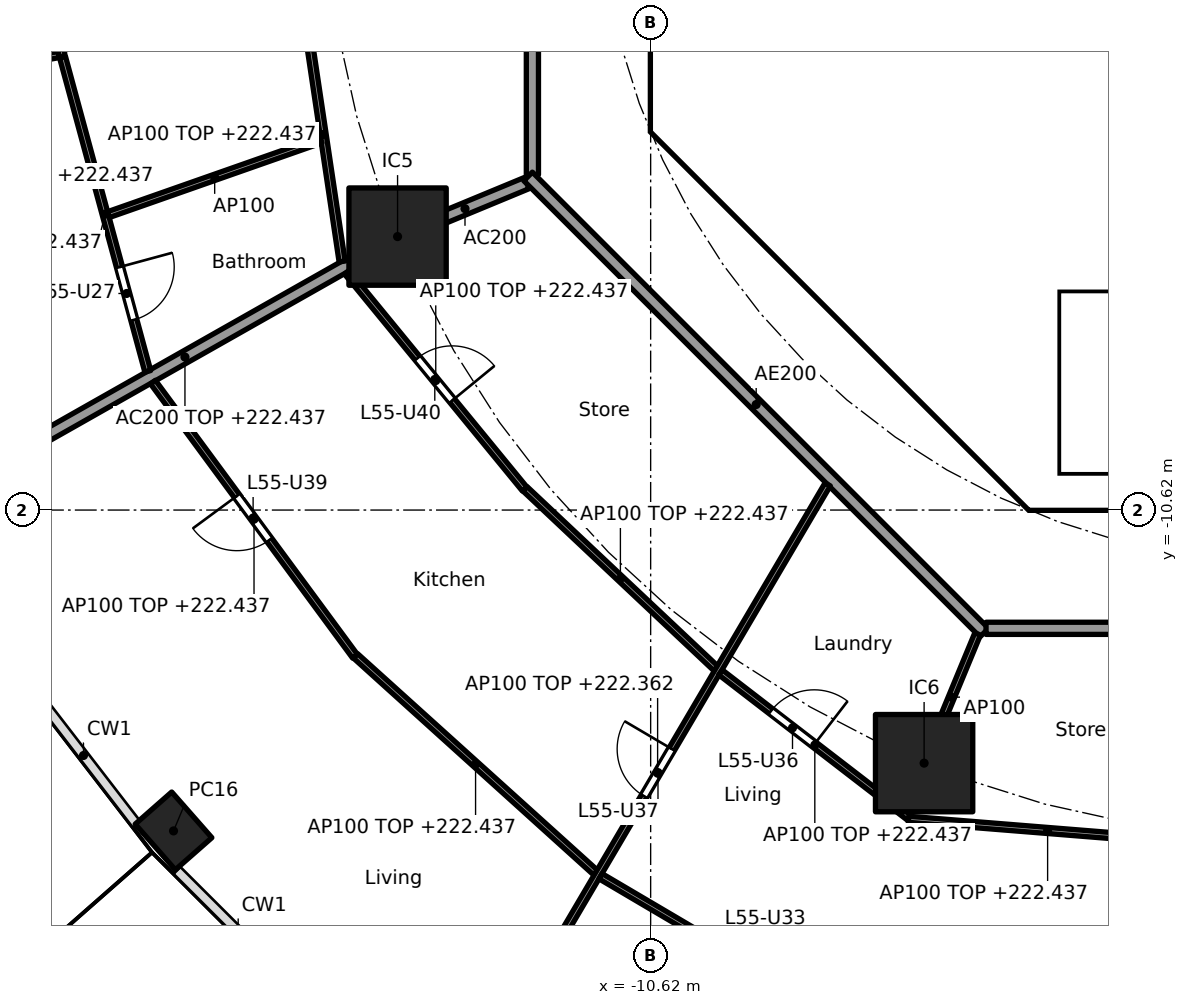
"""IFC4 building model, lengths in metres.
Left out: names, types, materials, properties, quantities, classifications, styles, units other than length and angle.
Written with IfcOpenShell. Run it as: python <this file> out.ifc"""

import sys

from ifc_helpers import new_model, si_unit, direction, frame, frame_2d, origin, origin_2d, place, context, subcontext, project, spatial, polyline, rectangle, hollow_rectangle, outline, extrude, element, fill, save


model = new_model("IFC4")
c1 = context("Model", 3, precision=1e-05, world=origin(), true_north=direction((0.0, 1.0)))
c2 = subcontext(c1, "Body", "Model", "MODEL_VIEW")
j1 = project(units=[si_unit("LENGTHUNIT", "METRE"), si_unit("PLANEANGLEUNIT", "RADIAN")], contexts=[c1])
p1 = place(None, origin())
s1 = spatial("IfcSite", under=j1, at=p1, CompositionType="ELEMENT")
p2 = place(p1, origin())
s2 = spatial("IfcBuilding", under=s1, at=p2, CompositionType="ELEMENT")
p3 = place(p2, frame((0.0, 0.0, 219.6)))
s3 = spatial("IfcBuildingStorey", under=s2, at=p3, CompositionType="ELEMENT", Elevation=219.6)
p4 = place(p3, frame((-18.467, -15.896, 0.0), z_axis=(0.0, 0.0, 1.0), x_axis=(0.660114607735, -0.751164898445, 0.0)))
e1 = element("IfcColumn", 1, at=p4, inside=s3, PredefinedType="COLUMN", context=c2, shape_type="SweptSolid", body=[
    extrude(hollow_rectangle(XDim=1.0, YDim=0.8, WallThickness=0.032, at=origin_2d()), origin(), (0.0, 0.0, 1.0), 3.7),
])
for number, where, z_axis, x_axis in (
    (2, (-14.782, -6.123, 0.0), (0.0, 0.0, 1.0), (1.0, 0.0, 0.0)),
    (3, (-6.123, -14.782, 0.0), (0.0, 0.0, 1.0), (1.0, 0.0, 0.0)),
):
    element("IfcColumn", number, at=place(p3, frame(where, z_axis=z_axis, x_axis=x_axis)), inside=s3, PredefinedType="COLUMN", context=c2, shape_type="SweptSolid", body=[
        extrude(rectangle(XDim=1.6, YDim=1.6, at=origin_2d()), origin(), (0.0, 0.0, 1.0), 3.7),
    ])
p5 = place(p3, frame((-10.325, 3.801, 0.0), z_axis=(0.0, 0.0, 1.0), x_axis=(0.0, -1.0, 0.0)))
e4 = element("IfcWall", 4, at=p5, inside=s3, PredefinedType="SHEAR", context=c2, shape_type="SweptSolid", body=[
    extrude(rectangle(XDim=7.602, YDim=0.6, at=frame_2d((3.801, 0.0))), origin(), (0.0, 0.0, 1.0), 3.44),
])
p6 = place(p5, frame((0.651, 0.0, 0.0)))
e5 = element("IfcOpeningElement", 5, at=p6, cuts=e4, PredefinedType="OPENING", context=c2, shape_type="SweptSolid", body=[
    extrude(rectangle(XDim=1.5, YDim=2.1, at=frame_2d((0.75, 1.05))), frame((0.0, 0.31, 0.0), z_axis=(0.0, -1.0, 0.0), x_axis=(1.0, 0.0, 0.0)), (0.0, 0.0, 1.0), 0.62),
])
p7 = place(p5, frame((5.451, 0.0, 0.0)))
e6 = element("IfcOpeningElement", 6, at=p7, cuts=e4, PredefinedType="OPENING", context=c2, shape_type="SweptSolid", body=[
    extrude(rectangle(XDim=1.5, YDim=2.1, at=frame_2d((0.75, 1.05))), frame((0.0, 0.31, 0.0), z_axis=(0.0, -1.0, 0.0), x_axis=(1.0, 0.0, 0.0)), (0.0, 0.0, 1.0), 0.62),
])
p8 = place(p3, frame((-9.988, -4.613, 0.0), z_axis=(0.0, 0.0, 1.0), x_axis=(0.707106781187, -0.707106781187, 0.0)))
e7 = element("IfcWall", 7, at=p8, inside=s3, PredefinedType="SHEAR", context=c2, shape_type="SweptSolid", body=[
    extrude(rectangle(XDim=7.602, YDim=0.6, at=frame_2d((3.801, 0.0))), origin(), (0.0, 0.0, 1.0), 3.44),
])
p9 = place(p8, frame((6.151, 0.0, 0.0)))
e8 = element("IfcOpeningElement", 8, at=p9, cuts=e7, PredefinedType="OPENING", context=c2, shape_type="SweptSolid", body=[
    extrude(rectangle(XDim=1.1, YDim=2.1, at=frame_2d((0.55, 1.05))), frame((0.0, 0.31, 0.0), z_axis=(0.0, -1.0, 0.0), x_axis=(1.0, 0.0, 0.0)), (0.0, 0.0, 1.0), 0.62),
])
p10 = place(p3, frame((-6.6, -7.427, 0.0), z_axis=(0.0, 0.0, 1.0), x_axis=(0.0, 1.0, 0.0)))
e9 = element("IfcWall", 9, at=p10, inside=s3, PredefinedType="PARTITIONING", context=c2, shape_type="SweptSolid", body=[
    extrude(rectangle(XDim=3.127, YDim=0.15, at=frame_2d((1.563, 0.0))), origin(), (0.0, 0.0, 1.0), 3.44),
])
p11 = place(p10, frame((1.076, 0.0, 0.0)))
e10 = element("IfcOpeningElement", 10, at=p11, cuts=e9, PredefinedType="OPENING", context=c2, shape_type="SweptSolid", body=[
    extrude(rectangle(XDim=0.9, YDim=2.1, at=frame_2d((0.45, 1.05))), frame((0.0, 0.085, 0.0), z_axis=(0.0, -1.0, 0.0), x_axis=(1.0, 0.0, 0.0)), (0.0, 0.0, 1.0), 0.17),
])
p12 = place(p3, frame((-4.0, -6.5, 0.0), z_axis=(0.0, 0.0, 1.0), x_axis=(0.0, 1.0, 0.0)))
e11 = element("IfcWall", 11, at=p12, inside=s3, PredefinedType="SOLIDWALL", context=c2, shape_type="SweptSolid", body=[
    extrude(rectangle(XDim=2.2, YDim=0.2, at=frame_2d((1.1, 0.0))), origin(), (0.0, 0.0, 1.0), 3.44),
])
p13 = place(p12, frame((0.65, 0.0, 0.0)))
e12 = element("IfcOpeningElement", 12, at=p13, cuts=e11, PredefinedType="OPENING", context=c2, shape_type="SweptSolid", body=[
    extrude(rectangle(XDim=0.9, YDim=2.1, at=frame_2d((0.45, 1.05))), frame((0.0, 0.11, 0.0), z_axis=(0.0, -1.0, 0.0), x_axis=(1.0, 0.0, 0.0)), (0.0, 0.0, 1.0), 0.22),
])
p14 = place(p3, origin())
e13 = element("IfcWall", 13, at=p14, inside=s3, PredefinedType="SHEAR", context=c2, shape_type="SweptSolid", body=[
    extrude(outline(polyline([(-10.625, -3.801), (-10.025, -3.801), (-10.025, -4.152), (-9.776, -4.401), (-10.2, -4.825), (-10.625, -4.401), (-10.625, -3.801)])), origin(), (0.0, 0.0, 1.0), 3.44),
])
p15 = place(p3, origin())
e14 = element("IfcWall", 14, at=p15, inside=s3, PredefinedType="SHEAR", context=c2, shape_type="SweptSolid", body=[
    extrude(outline(polyline([(-4.152, -10.025), (4.152, -10.025), (4.401, -9.776), (4.825, -10.2), (4.401, -10.625), (-4.401, -10.625), (-4.825, -10.2), (-4.401, -9.776), (-4.152, -10.025)])), origin(), (0.0, 0.0, 1.0), 3.44),
])
p16 = place(p3, frame((-10.025, -4.0, 0.0), z_axis=(0.0, 0.0, 1.0), x_axis=(1.0, 0.0, 0.0)))
e15 = element("IfcWall", 15, at=p16, inside=s3, PredefinedType="PARTITIONING", context=c2, shape_type="SweptSolid", body=[
    extrude(rectangle(XDim=3.325, YDim=0.2, at=frame_2d((1.662, 0.0))), origin(), (0.0, 0.0, 1.0), 3.44),
])
p17 = place(p3, origin())
e16 = element("IfcWall", 16, at=p17, inside=s3, PredefinedType="SOLIDWALL", context=c2, shape_type="SweptSolid", body=[
    extrude(outline(polyline([(-6.7, -2.1), (-6.5, -2.1), (-6.5, -4.1), (-2.3, -4.1), (-2.3, -2.1), (-2.1, -2.1), (-2.1, -4.1), (-0.1, -4.1), (-0.1, -2.1), (0.1, -2.1), (0.1, -4.1), (2.1, -4.1), (2.1, -2.1), (2.3, -2.1), (2.3, -4.1), (4.3, -4.1), (4.3, -2.1), (4.5, -2.1), (4.5, -4.1), (6.5, -4.1), (6.5, -2.1), (6.7, -2.1), (6.7, -4.3), (-6.7, -4.3), (-6.7, -2.1)])), origin(), (0.0, 0.0, 1.0), 3.44),
])
p18 = place(p3, origin())
e17 = element("IfcWall", 17, at=p18, inside=s3, PredefinedType="SOLIDWALL", context=c2, shape_type="SweptSolid", body=[
    extrude(outline(polyline([(-3.9, -10.025), (-4.1, -10.025), (-4.1, -7.025), (-3.9, -7.025), (-3.9, -10.025)])), origin(), (0.0, 0.0, 1.0), 3.44),
])
p19 = place(p3, origin())
e18 = element("IfcWall", 18, at=p19, inside=s3, PredefinedType="SOLIDWALL", context=c2, shape_type="SweptSolid", body=[
    extrude(outline(polyline([(4.1, -7.025), (-4.1, -7.025), (-4.1, -6.5), (4.1, -6.5), (4.1, -7.025)])), origin(), (0.0, 0.0, 1.0), 3.44),
])
p20 = place(p3, frame((-12.657, -5.243, 0.0), z_axis=(0.0, 0.0, 1.0), x_axis=(-0.923859888513, -0.38273085373, 0.0)))
e19 = element("IfcWall", 19, at=p20, inside=s3, PredefinedType="PARTITIONING", context=c2, shape_type="SweptSolid", body=[
    extrude(rectangle(XDim=2.199, YDim=0.2, at=frame_2d((1.1, 0.0))), origin(), (0.0, 0.0, 1.0), 3.44),
])
p21 = place(p3, frame((-14.825, -6.148, 0.0), z_axis=(0.0, 0.0, 1.0), x_axis=(-0.870099576105, -0.492875975944, 0.0)))
e20 = element("IfcWall", 20, at=p21, inside=s3, PredefinedType="PARTITIONING", context=c2, shape_type="SweptSolid", body=[
    extrude(rectangle(XDim=7.937, YDim=0.2, at=frame_2d((3.969, 0.0))), origin(), (0.0, 0.0, 1.0), 2.837),
])
p22 = place(p3, frame((-12.565, 5.304, 0.0), z_axis=(0.0, 0.0, 1.0), x_axis=(0.0, -1.0, 0.0)))
e21 = element("IfcWall", 21, at=p22, inside=s3, PredefinedType="PARTITIONING", context=c2, shape_type="SweptSolid", body=[
    extrude(rectangle(XDim=10.409, YDim=0.2, at=frame_2d((5.205, 0.0))), origin(), (0.0, 0.0, 1.0), 3.44),
])
p23 = place(p22, frame((3.07, 0.0, 0.0)))
e22 = element("IfcOpeningElement", 22, at=p23, cuts=e21, PredefinedType="OPENING", context=c2, shape_type="SweptSolid", body=[
    extrude(rectangle(XDim=1.0, YDim=2.1, at=frame_2d((0.5, 1.05))), frame((0.0, 0.11, 0.0), z_axis=(0.0, -1.0, 0.0), x_axis=(1.0, 0.0, 0.0)), (0.0, 0.0, 1.0), 0.22),
])
p24 = place(p3, frame((-12.635, -5.134, 0.0), z_axis=(0.0, 0.0, 1.0), x_axis=(0.707106781187, -0.707106781187, 0.0)))
e23 = element("IfcWall", 23, at=p24, inside=s3, PredefinedType="PARTITIONING", context=c2, shape_type="SweptSolid", body=[
    extrude(rectangle(XDim=10.609, YDim=0.2, at=frame_2d((5.305, 0.0))), origin(), (0.0, 0.0, 1.0), 3.44),
])
p25 = place(p3, frame((-5.104, -12.565, 0.0), z_axis=(0.0, 0.0, 1.0), x_axis=(1.0, 0.0, 0.0)))
e24 = element("IfcWall", 24, at=p25, inside=s3, PredefinedType="PARTITIONING", context=c2, shape_type="SweptSolid", body=[
    extrude(rectangle(XDim=10.409, YDim=0.2, at=frame_2d((5.205, 0.0))), origin(), (0.0, 0.0, 1.0), 3.44),
])
p26 = place(p25, frame((4.604, 0.0, 0.0)))
e25 = element("IfcOpeningElement", 25, at=p26, cuts=e24, PredefinedType="OPENING", context=c2, shape_type="SweptSolid", body=[
    extrude(rectangle(XDim=1.0, YDim=2.1, at=frame_2d((0.5, 1.05))), frame((0.0, 0.11, 0.0), z_axis=(0.0, -1.0, 0.0), x_axis=(1.0, 0.0, 0.0)), (0.0, 0.0, 1.0), 0.22),
])
p27 = place(p3, frame((-20.81, 2.542, 0.0), z_axis=(0.0, 0.0, 1.0), x_axis=(0.088651453697, -0.996062708748, 0.0)))
e26 = element("IfcWall", 26, at=p27, inside=s3, PredefinedType="PARTITIONING", context=c2, shape_type="SweptSolid", body=[
    extrude(rectangle(XDim=5.737, YDim=0.1, at=frame_2d((2.868, 0.0))), origin(), (0.0, 0.0, 1.0), 2.837),
])
p28 = place(p3, frame((-16.318, -2.356, 0.0), z_axis=(0.0, 0.0, 1.0), x_axis=(0.147684413341, -0.989034536331, 0.0)))
e27 = element("IfcWall", 27, at=p28, inside=s3, PredefinedType="PARTITIONING", context=c2, shape_type="SweptSolid", body=[
    extrude(rectangle(XDim=4.222, YDim=0.1, at=frame_2d((2.111, 0.0))), origin(), (0.0, 0.0, 1.0), 2.837),
])
p29 = place(p3, frame((-20.355, -3.13, 0.0), z_axis=(0.0, 0.0, 1.0), x_axis=(-0.984331377639, -0.1763284974, 0.0)))
e28 = element("IfcWall", 28, at=p29, inside=s3, PredefinedType="PARTITIONING", context=c2, shape_type="SweptSolid", body=[
    extrude(rectangle(XDim=3.723, YDim=0.1, at=frame_2d((1.862, 0.0))), origin(), (0.0, 0.0, 1.0), 2.837),
])
p30 = place(p29, frame((1.412, 0.0, 0.0)))
e29 = element("IfcOpeningElement", 29, at=p30, cuts=e28, PredefinedType="OPENING", context=c2, shape_type="SweptSolid", body=[
    extrude(rectangle(XDim=0.9, YDim=2.1, at=frame_2d((0.45, 1.05))), frame((0.0, 0.06, 0.0), z_axis=(0.0, -1.0, 0.0), x_axis=(1.0, 0.0, 0.0)), (0.0, 0.0, 1.0), 0.12),
])
p31 = place(p3, frame((-20.292, -3.17, 0.0), z_axis=(0.0, 0.0, 1.0), x_axis=(0.26187906236, -0.965100697698, 0.0)))
e30 = element("IfcWall", 30, at=p31, inside=s3, PredefinedType="PARTITIONING", context=c2, shape_type="SweptSolid", body=[
    extrude(rectangle(XDim=5.356, YDim=0.1, at=frame_2d((2.678, 0.0))), origin(), (0.0, 0.0, 1.0), 2.837),
])
p32 = place(p31, frame((3.579, 0.0, 0.0)))
e31 = element("IfcOpeningElement", 31, at=p32, cuts=e30, PredefinedType="OPENING", context=c2, shape_type="SweptSolid", body=[
    extrude(rectangle(XDim=0.9, YDim=2.1, at=frame_2d((0.45, 1.05))), frame((0.0, 0.06, 0.0), z_axis=(0.0, -1.0, 0.0), x_axis=(1.0, 0.0, 0.0)), (0.0, 0.0, 1.0), 0.12),
])
p33 = place(p3, frame((-16.042, -4.535, 0.0), z_axis=(0.0, 0.0, 1.0), x_axis=(-0.94358986717, -0.331116539265, 0.0)))
e32 = element("IfcWall", 32, at=p33, inside=s3, PredefinedType="PARTITIONING", context=c2, shape_type="SweptSolid", body=[
    extrude(rectangle(XDim=3.704, YDim=0.1, at=frame_2d((1.852, 0.0))), origin(), (0.0, 0.0, 1.0), 3.44),
])
p34 = place(p3, frame((-15.616, -6.708, 0.0), z_axis=(0.0, 0.0, 1.0), x_axis=(0.634076422357, -0.773270386483, 0.0)))
e33 = element("IfcWall", 33, at=p34, inside=s3, PredefinedType="PARTITIONING", context=c2, shape_type="SweptSolid", body=[
    extrude(rectangle(XDim=4.611, YDim=0.1, at=frame_2d((2.306, 0.0))), origin(), (0.0, 0.0, 1.0), 2.837),
])
p35 = place(p34, frame((1.831, 0.0, 0.0)))
e34 = element("IfcOpeningElement", 34, at=p35, cuts=e33, PredefinedType="OPENING", context=c2, shape_type="SweptSolid", body=[
    extrude(rectangle(XDim=0.9, YDim=2.1, at=frame_2d((0.45, 1.05))), frame((0.0, 0.06, 0.0), z_axis=(0.0, -1.0, 0.0), x_axis=(1.0, 0.0, 0.0)), (0.0, 0.0, 1.0), 0.12),
])
p36 = place(p3, frame((-18.804, -8.516, 0.0), z_axis=(0.0, 0.0, 1.0), x_axis=(0.593249583583, -0.805018590828, 0.0)))
e35 = element("IfcWall", 35, at=p36, inside=s3, PredefinedType="PARTITIONING", context=c2, shape_type="SweptSolid", body=[
    extrude(rectangle(XDim=5.602, YDim=0.1, at=frame_2d((2.801, 0.0))), origin(), (0.0, 0.0, 1.0), 2.837),
])
p37 = place(p36, frame((2.326, 0.0, 0.0)))
e36 = element("IfcOpeningElement", 36, at=p37, cuts=e35, PredefinedType="OPENING", context=c2, shape_type="SweptSolid", body=[
    extrude(rectangle(XDim=0.9, YDim=2.1, at=frame_2d((0.45, 1.05))), frame((0.0, 0.06, 0.0), z_axis=(0.0, -1.0, 0.0), x_axis=(1.0, 0.0, 0.0)), (0.0, 0.0, 1.0), 0.12),
])
p38 = place(p3, frame((-12.688, -10.27, 0.0), z_axis=(0.0, 0.0, 1.0), x_axis=(0.728268142903, -0.685292282192, 0.0)))
e37 = element("IfcWall", 37, at=p38, inside=s3, PredefinedType="PARTITIONING", context=c2, shape_type="SweptSolid", body=[
    extrude(rectangle(XDim=4.312, YDim=0.1, at=frame_2d((2.156, 0.0))), origin(), (0.0, 0.0, 1.0), 2.837),
])
p39 = place(p3, frame((-15.474, -13.019, 0.0), z_axis=(0.0, 0.0, 1.0), x_axis=(0.742348572616, -0.670013878017, 0.0)))
e38 = element("IfcWall", 38, at=p39, inside=s3, PredefinedType="PARTITIONING", context=c2, shape_type="SweptSolid", body=[
    extrude(rectangle(XDim=5.319, YDim=0.1, at=frame_2d((2.66, 0.0))), origin(), (0.0, 0.0, 1.0), 2.837),
])
p40 = place(p3, frame((-7.709, -10.198, 0.0), z_axis=(0.0, 0.0, 1.0), x_axis=(-0.507355901053, -0.8617366127, 0.0)))
e39 = element("IfcWall", 39, at=p40, inside=s3, PredefinedType="PARTITIONING", context=c2, shape_type="SweptSolid", body=[
    extrude(rectangle(XDim=11.025, YDim=0.1, at=frame_2d((5.512, 0.0))), origin(), (0.0, 0.0, 1.0), 2.762),
])
p41 = place(p40, frame((5.05, 0.0, 0.0)))
e40 = element("IfcOpeningElement", 40, at=p41, cuts=e39, PredefinedType="OPENING", context=c2, shape_type="SweptSolid", body=[
    extrude(rectangle(XDim=0.9, YDim=2.1, at=frame_2d((0.45, 1.05))), frame((0.0, 0.06, 0.0), z_axis=(0.0, -1.0, 0.0), x_axis=(1.0, 0.0, 0.0)), (0.0, 0.0, 1.0), 0.12),
])
p42 = place(p3, frame((-9.471, -13.289, 0.0), z_axis=(0.0, 0.0, 1.0), x_axis=(0.7922205419, -0.61023488346, 0.0)))
e41 = element("IfcWall", 41, at=p42, inside=s3, PredefinedType="PARTITIONING", context=c2, shape_type="SweptSolid", body=[
    extrude(rectangle(XDim=3.916, YDim=0.1, at=frame_2d((1.958, 0.0))), origin(), (0.0, 0.0, 1.0), 2.837),
])
p43 = place(p42, frame((1.045, 0.0, 0.0)))
e42 = element("IfcOpeningElement", 42, at=p43, cuts=e41, PredefinedType="OPENING", context=c2, shape_type="SweptSolid", body=[
    extrude(rectangle(XDim=0.9, YDim=2.1, at=frame_2d((0.45, 1.05))), frame((0.0, 0.06, 0.0), z_axis=(0.0, -1.0, 0.0), x_axis=(1.0, 0.0, 0.0)), (0.0, 0.0, 1.0), 0.12),
])
p44 = place(p3, frame((-11.445, -16.641, 0.0), z_axis=(0.0, 0.0, 1.0), x_axis=(0.861562560957, -0.507651409489, 0.0)))
e43 = element("IfcWall", 43, at=p44, inside=s3, PredefinedType="PARTITIONING", context=c2, shape_type="SweptSolid", body=[
    extrude(rectangle(XDim=4.985, YDim=0.1, at=frame_2d((2.492, 0.0))), origin(), (0.0, 0.0, 1.0), 2.837),
])
p45 = place(p44, frame((2.042, 0.0, 0.0)))
e44 = element("IfcOpeningElement", 44, at=p45, cuts=e43, PredefinedType="OPENING", context=c2, shape_type="SweptSolid", body=[
    extrude(rectangle(XDim=0.9, YDim=2.1, at=frame_2d((0.45, 1.05))), frame((0.0, 0.06, 0.0), z_axis=(0.0, -1.0, 0.0), x_axis=(1.0, 0.0, 0.0)), (0.0, 0.0, 1.0), 0.12),
])
p46 = place(p3, frame((-5.243, -12.657, 0.0), z_axis=(0.0, 0.0, 1.0), x_axis=(-0.382719158442, -0.923864733477, 0.0)))
e45 = element("IfcWall", 45, at=p46, inside=s3, PredefinedType="PARTITIONING", context=c2, shape_type="SweptSolid", body=[
    extrude(rectangle(XDim=2.25, YDim=0.1, at=frame_2d((1.125, 0.0))), origin(), (0.0, 0.0, 1.0), 3.44),
])
p47 = place(p3, frame((-6.379, -15.705, 0.0), z_axis=(0.0, 0.0, 1.0), x_axis=(0.996786462227, -0.080104611105, 0.0)))
e46 = element("IfcWall", 46, at=p47, inside=s3, PredefinedType="PARTITIONING", context=c2, shape_type="SweptSolid", body=[
    extrude(rectangle(XDim=4.59, YDim=0.1, at=frame_2d((2.295, 0.0))), origin(), (0.0, 0.0, 1.0), 2.837),
])
p48 = place(p11, origin())
e47 = element("IfcDoor", 47, at=p48, inside=s3, OperationType="SINGLE_SWING_RIGHT", PredefinedType="DOOR", context=c2, shape_type="SweptSolid", body=[
    extrude(rectangle(XDim=0.9, YDim=2.1, at=frame_2d((0.45, 1.05))), frame((0.0, 0.025, 0.0), z_axis=(0.0, -1.0, 0.0), x_axis=(1.0, 0.0, 0.0)), (0.0, 0.0, 1.0), 0.05),
])
fill(e10, e47)
p49 = place(p13, frame((0.9, 0.0, 0.0), x_axis=(-1.0, 0.0, 0.0)))
e48 = element("IfcDoor", 48, at=p49, inside=s3, OperationType="SINGLE_SWING_RIGHT", PredefinedType="DOOR", context=c2, shape_type="SweptSolid", body=[
    extrude(rectangle(XDim=0.9, YDim=2.1, at=frame_2d((0.45, 1.05))), frame((0.0, 0.025, 0.0), z_axis=(0.0, -1.0, 0.0), x_axis=(1.0, 0.0, 0.0)), (0.0, 0.0, 1.0), 0.05),
])
fill(e12, e48)
p50 = place(p7, origin())
e49 = element("IfcDoor", 49, at=p50, inside=s3, OperationType="DOUBLE_DOOR_SINGLE_SWING", PredefinedType="DOOR", context=c2, shape_type="SweptSolid", body=[
    extrude(rectangle(XDim=1.5, YDim=2.1, at=frame_2d((0.75, 1.05))), frame((0.0, 0.025, 0.0), z_axis=(0.0, -1.0, 0.0), x_axis=(1.0, 0.0, 0.0)), (0.0, 0.0, 1.0), 0.05),
])
fill(e6, e49)
p51 = place(p9, origin())
e50 = element("IfcDoor", 50, at=p51, inside=s3, OperationType="SINGLE_SWING_RIGHT", PredefinedType="DOOR", context=c2, shape_type="SweptSolid", body=[
    extrude(rectangle(XDim=1.1, YDim=2.1, at=frame_2d((0.55, 1.05))), frame((0.0, 0.025, 0.0), z_axis=(0.0, -1.0, 0.0), x_axis=(1.0, 0.0, 0.0)), (0.0, 0.0, 1.0), 0.05),
])
fill(e8, e50)
p52 = place(p32, origin())
e51 = element("IfcDoor", 51, at=p52, inside=s3, OperationType="SINGLE_SWING_LEFT", PredefinedType="DOOR", context=c2, shape_type="SweptSolid", body=[
    extrude(rectangle(XDim=0.9, YDim=2.1, at=frame_2d((0.45, 1.05))), frame((0.0, 0.025, 0.0), z_axis=(0.0, -1.0, 0.0), x_axis=(1.0, 0.0, 0.0)), (0.0, 0.0, 1.0), 0.05),
])
fill(e31, e51)
p53 = place(p43, origin())
e52 = element("IfcDoor", 52, at=p53, inside=s3, OperationType="SINGLE_SWING_RIGHT", PredefinedType="DOOR", context=c2, shape_type="SweptSolid", body=[
    extrude(rectangle(XDim=0.9, YDim=2.1, at=frame_2d((0.45, 1.05))), frame((0.0, 0.025, 0.0), z_axis=(0.0, -1.0, 0.0), x_axis=(1.0, 0.0, 0.0)), (0.0, 0.0, 1.0), 0.05),
])
fill(e42, e52)
p54 = place(p41, frame((0.9, 0.0, 0.0), x_axis=(-1.0, 0.0, 0.0)))
e53 = element("IfcDoor", 53, at=p54, inside=s3, OperationType="SINGLE_SWING_RIGHT", PredefinedType="DOOR", context=c2, shape_type="SweptSolid", body=[
    extrude(rectangle(XDim=0.9, YDim=2.1, at=frame_2d((0.45, 1.05))), frame((0.0, 0.025, 0.0), z_axis=(0.0, -1.0, 0.0), x_axis=(1.0, 0.0, 0.0)), (0.0, 0.0, 1.0), 0.05),
])
fill(e40, e53)
p55 = place(p37, frame((0.9, 0.0, 0.0), x_axis=(-1.0, 0.0, 0.0)))
e54 = element("IfcDoor", 54, at=p55, inside=s3, OperationType="SINGLE_SWING_RIGHT", PredefinedType="DOOR", context=c2, shape_type="SweptSolid", body=[
    extrude(rectangle(XDim=0.9, YDim=2.1, at=frame_2d((0.45, 1.05))), frame((0.0, 0.025, 0.0), z_axis=(0.0, -1.0, 0.0), x_axis=(1.0, 0.0, 0.0)), (0.0, 0.0, 1.0), 0.05),
])
fill(e36, e54)
p56 = place(p35, origin())
e55 = element("IfcDoor", 55, at=p56, inside=s3, OperationType="SINGLE_SWING_RIGHT", PredefinedType="DOOR", context=c2, shape_type="SweptSolid", body=[
    extrude(rectangle(XDim=0.9, YDim=2.1, at=frame_2d((0.45, 1.05))), frame((0.0, 0.025, 0.0), z_axis=(0.0, -1.0, 0.0), x_axis=(1.0, 0.0, 0.0)), (0.0, 0.0, 1.0), 0.05),
])
fill(e34, e55)
save(model, sys.argv[1])
